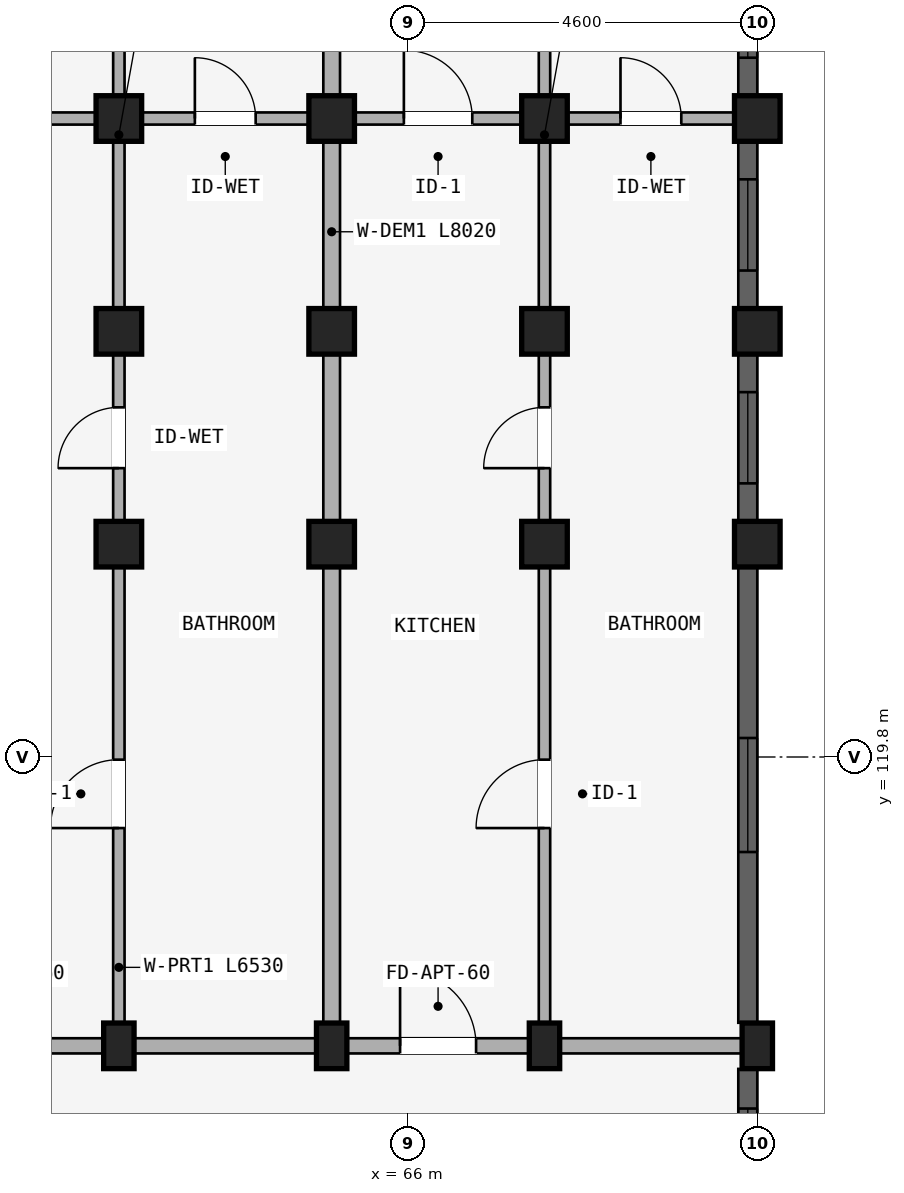
"""IFC4 building model, lengths in metres.
Left out: names, types, materials, properties, quantities, classifications, styles, units other than length and angle.
Written with IfcOpenShell. Run it as: python <this file> out.ifc"""

import sys

from ifc_helpers import new_model, si_unit, direction, frame, frame_2d, origin, origin_2d, place, context, subcontext, project, spatial, rectangle, extrude, element, fill, save


model = new_model("IFC4")
c1 = context("Model", 3, precision=1e-05, world=origin(), true_north=direction((0.0, 1.0)))
c2 = subcontext(c1, "Body", "Model", "MODEL_VIEW")
j1 = project(units=[si_unit("LENGTHUNIT", "METRE"), si_unit("PLANEANGLEUNIT", "RADIAN")], contexts=[c1])
p1 = place(None, origin())
s1 = spatial("IfcSite", under=j1, at=p1, CompositionType="ELEMENT")
p2 = place(p1, origin())
s2 = spatial("IfcBuilding", under=s1, at=p2, CompositionType="ELEMENT")
p3 = place(p2, frame((0.0, 0.0, 40.2)))
s3 = spatial("IfcBuildingStorey", under=s2, at=p3, CompositionType="ELEMENT", Elevation=40.2)
p4 = place(p3, frame((62.2, 116.0, 0.0), z_axis=(0.0, 0.0, 1.0), x_axis=(1.0, 0.0, 0.0)))
e1 = element("IfcColumn", 1, at=p4, inside=s3, PredefinedType="COLUMN", context=c2, shape_type="SweptSolid", body=[
    extrude(rectangle(XDim=0.4, YDim=0.6, at=origin_2d()), origin(), (0.0, 0.0, 1.0), 2.93),
])
for number, where, z_axis, x_axis in (
    (2, (62.2, 122.6, 0.0), (0.0, 0.0, 1.0), (1.0, 0.0, 0.0)),
    (3, (62.2, 125.4, 0.0), (0.0, 0.0, 1.0), (1.0, 0.0, 0.0)),
    (4, (62.2, 128.2, 0.0), (0.0, 0.0, 1.0), (1.0, 0.0, 0.0)),
):
    element("IfcColumn", number, at=place(p3, frame(where, z_axis=z_axis, x_axis=x_axis)), inside=s3, PredefinedType="COLUMN", context=c2, shape_type="SweptSolid", body=[
        extrude(rectangle(XDim=0.6, YDim=0.6, at=origin_2d()), origin(), (0.0, 0.0, 1.0), 2.93),
    ])
p5 = place(p3, frame((65.0, 116.0, 0.0), z_axis=(0.0, 0.0, 1.0), x_axis=(1.0, 0.0, 0.0)))
e5 = element("IfcColumn", 5, at=p5, inside=s3, PredefinedType="COLUMN", context=c2, shape_type="SweptSolid", body=[
    extrude(rectangle(XDim=0.4, YDim=0.6, at=origin_2d()), origin(), (0.0, 0.0, 1.0), 2.93),
])
for number, where, z_axis, x_axis in (
    (6, (65.0, 122.6, 0.0), (0.0, 0.0, 1.0), (1.0, 0.0, 0.0)),
    (7, (65.0, 125.4, 0.0), (0.0, 0.0, 1.0), (1.0, 0.0, 0.0)),
    (8, (65.0, 128.2, 0.0), (0.0, 0.0, 1.0), (1.0, 0.0, 0.0)),
):
    element("IfcColumn", number, at=place(p3, frame(where, z_axis=z_axis, x_axis=x_axis)), inside=s3, PredefinedType="COLUMN", context=c2, shape_type="SweptSolid", body=[
        extrude(rectangle(XDim=0.6, YDim=0.6, at=origin_2d()), origin(), (0.0, 0.0, 1.0), 2.93),
    ])
p6 = place(p3, frame((67.8, 116.0, 0.0), z_axis=(0.0, 0.0, 1.0), x_axis=(1.0, 0.0, 0.0)))
e9 = element("IfcColumn", 9, at=p6, inside=s3, PredefinedType="COLUMN", context=c2, shape_type="SweptSolid", body=[
    extrude(rectangle(XDim=0.4, YDim=0.6, at=origin_2d()), origin(), (0.0, 0.0, 1.0), 2.93),
])
for number, where, z_axis, x_axis in (
    (10, (67.8, 122.6, 0.0), (0.0, 0.0, 1.0), (1.0, 0.0, 0.0)),
    (11, (67.8, 125.4, 0.0), (0.0, 0.0, 1.0), (1.0, 0.0, 0.0)),
    (12, (67.8, 128.2, 0.0), (0.0, 0.0, 1.0), (1.0, 0.0, 0.0)),
):
    element("IfcColumn", number, at=place(p3, frame(where, z_axis=z_axis, x_axis=x_axis)), inside=s3, PredefinedType="COLUMN", context=c2, shape_type="SweptSolid", body=[
        extrude(rectangle(XDim=0.6, YDim=0.6, at=origin_2d()), origin(), (0.0, 0.0, 1.0), 2.93),
    ])
p7 = place(p3, frame((70.6, 116.0, 0.0), z_axis=(0.0, 0.0, 1.0), x_axis=(1.0, 0.0, 0.0)))
e13 = element("IfcColumn", 13, at=p7, inside=s3, PredefinedType="COLUMN", context=c2, shape_type="SweptSolid", body=[
    extrude(rectangle(XDim=0.4, YDim=0.6, at=origin_2d()), origin(), (0.0, 0.0, 1.0), 2.93),
])
for number, where, z_axis, x_axis in (
    (14, (70.6, 122.6, 0.0), (0.0, 0.0, 1.0), (1.0, 0.0, 0.0)),
    (15, (70.6, 125.4, 0.0), (0.0, 0.0, 1.0), (1.0, 0.0, 0.0)),
    (16, (70.6, 128.2, 0.0), (0.0, 0.0, 1.0), (1.0, 0.0, 0.0)),
):
    element("IfcColumn", number, at=place(p3, frame(where, z_axis=z_axis, x_axis=x_axis)), inside=s3, PredefinedType="COLUMN", context=c2, shape_type="SweptSolid", body=[
        extrude(rectangle(XDim=0.6, YDim=0.6, at=origin_2d()), origin(), (0.0, 0.0, 1.0), 2.93),
    ])
p8 = place(p3, frame((59.4, 116.0, 0.0), z_axis=(0.0, 0.0, 1.0), x_axis=(1.0, 0.0, 0.0)))
e17 = element("IfcWall", 17, at=p8, inside=s3, PredefinedType="STANDARD", context=c2, shape_type="SweptSolid", body=[
    extrude(rectangle(XDim=2.8, YDim=0.2, at=frame_2d((1.4, 0.0))), origin(), (0.0, 0.0, 1.0), 2.372),
])
p9 = place(p8, frame((0.9, 0.0, 0.0)))
e18 = element("IfcOpeningElement", 18, at=p9, cuts=e17, PredefinedType="OPENING", context=c2, shape_type="SweptSolid", body=[
    extrude(rectangle(XDim=1.0, YDim=2.15, at=frame_2d((0.5, 1.075))), frame((0.0, 0.11, 0.0), z_axis=(0.0, -1.0, 0.0), x_axis=(1.0, 0.0, 0.0)), (0.0, 0.0, 1.0), 0.22),
])
p10 = place(p3, frame((59.48, 128.2, 0.0), z_axis=(0.0, 0.0, 1.0), x_axis=(1.0, 0.0, 0.0)))
e19 = element("IfcWall", 19, at=p10, inside=s3, PredefinedType="PLUMBINGWALL", context=c2, shape_type="SweptSolid", body=[
    extrude(rectangle(XDim=2.64, YDim=0.16, at=frame_2d((1.32, 0.0))), origin(), (0.0, 0.0, 1.0), 2.372),
])
p11 = place(p10, frame((0.87, 0.0, 0.0)))
e20 = element("IfcOpeningElement", 20, at=p11, cuts=e19, PredefinedType="OPENING", context=c2, shape_type="SweptSolid", body=[
    extrude(rectangle(XDim=0.9, YDim=2.1, at=frame_2d((0.45, 1.05))), frame((0.0, 0.09, 0.0), z_axis=(0.0, -1.0, 0.0), x_axis=(1.0, 0.0, 0.0)), (0.0, 0.0, 1.0), 0.18),
])
p12 = place(p3, frame((62.2, 116.0, 0.0), z_axis=(0.0, 0.0, 1.0), x_axis=(1.0, 0.0, 0.0)))
e21 = element("IfcWall", 21, at=p12, inside=s3, PredefinedType="STANDARD", context=c2, shape_type="SweptSolid", body=[
    extrude(rectangle(XDim=2.8, YDim=0.2, at=frame_2d((1.4, 0.0))), origin(), (0.0, 0.0, 1.0), 2.372),
])
p13 = place(p3, frame((62.28, 128.2, 0.0), z_axis=(0.0, 0.0, 1.0), x_axis=(1.0, 0.0, 0.0)))
e22 = element("IfcWall", 22, at=p13, inside=s3, PredefinedType="PLUMBINGWALL", context=c2, shape_type="SweptSolid", body=[
    extrude(rectangle(XDim=2.64, YDim=0.16, at=frame_2d((1.32, 0.0))), origin(), (0.0, 0.0, 1.0), 2.372),
])
p14 = place(p13, frame((0.92, 0.0, 0.0)))
e23 = element("IfcOpeningElement", 23, at=p14, cuts=e22, PredefinedType="OPENING", context=c2, shape_type="SweptSolid", body=[
    extrude(rectangle(XDim=0.8, YDim=2.1, at=frame_2d((0.4, 1.05))), frame((0.0, 0.09, 0.0), z_axis=(0.0, -1.0, 0.0), x_axis=(1.0, 0.0, 0.0)), (0.0, 0.0, 1.0), 0.18),
])
p15 = place(p3, frame((65.0, 116.0, 0.0), z_axis=(0.0, 0.0, 1.0), x_axis=(1.0, 0.0, 0.0)))
e24 = element("IfcWall", 24, at=p15, inside=s3, PredefinedType="STANDARD", context=c2, shape_type="SweptSolid", body=[
    extrude(rectangle(XDim=2.8, YDim=0.2, at=frame_2d((1.4, 0.0))), origin(), (0.0, 0.0, 1.0), 2.372),
])
p16 = place(p15, frame((0.9, 0.0, 0.0)))
e25 = element("IfcOpeningElement", 25, at=p16, cuts=e24, PredefinedType="OPENING", context=c2, shape_type="SweptSolid", body=[
    extrude(rectangle(XDim=1.0, YDim=2.15, at=frame_2d((0.5, 1.075))), frame((0.0, 0.11, 0.0), z_axis=(0.0, -1.0, 0.0), x_axis=(1.0, 0.0, 0.0)), (0.0, 0.0, 1.0), 0.22),
])
p17 = place(p3, frame((65.08, 128.2, 0.0), z_axis=(0.0, 0.0, 1.0), x_axis=(1.0, 0.0, 0.0)))
e26 = element("IfcWall", 26, at=p17, inside=s3, PredefinedType="PLUMBINGWALL", context=c2, shape_type="SweptSolid", body=[
    extrude(rectangle(XDim=2.64, YDim=0.16, at=frame_2d((1.32, 0.0))), origin(), (0.0, 0.0, 1.0), 2.372),
])
p18 = place(p17, frame((0.87, 0.0, 0.0)))
e27 = element("IfcOpeningElement", 27, at=p18, cuts=e26, PredefinedType="OPENING", context=c2, shape_type="SweptSolid", body=[
    extrude(rectangle(XDim=0.9, YDim=2.1, at=frame_2d((0.45, 1.05))), frame((0.0, 0.09, 0.0), z_axis=(0.0, -1.0, 0.0), x_axis=(1.0, 0.0, 0.0)), (0.0, 0.0, 1.0), 0.18),
])
p19 = place(p3, frame((67.8, 116.0, 0.0), z_axis=(0.0, 0.0, 1.0), x_axis=(1.0, 0.0, 0.0)))
e28 = element("IfcWall", 28, at=p19, inside=s3, PredefinedType="STANDARD", context=c2, shape_type="SweptSolid", body=[
    extrude(rectangle(XDim=2.8, YDim=0.2, at=frame_2d((1.4, 0.0))), origin(), (0.0, 0.0, 1.0), 2.372),
])
p20 = place(p3, frame((67.88, 128.2, 0.0), z_axis=(0.0, 0.0, 1.0), x_axis=(1.0, 0.0, 0.0)))
e29 = element("IfcWall", 29, at=p20, inside=s3, PredefinedType="PLUMBINGWALL", context=c2, shape_type="SweptSolid", body=[
    extrude(rectangle(XDim=2.64, YDim=0.16, at=frame_2d((1.32, 0.0))), origin(), (0.0, 0.0, 1.0), 2.372),
])
p21 = place(p20, frame((0.92, 0.0, 0.0)))
e30 = element("IfcOpeningElement", 30, at=p21, cuts=e29, PredefinedType="OPENING", context=c2, shape_type="SweptSolid", body=[
    extrude(rectangle(XDim=0.8, YDim=2.1, at=frame_2d((0.4, 1.05))), frame((0.0, 0.09, 0.0), z_axis=(0.0, -1.0, 0.0), x_axis=(1.0, 0.0, 0.0)), (0.0, 0.0, 1.0), 0.18),
])
p22 = place(p3, frame((62.2, 116.05, 0.0), z_axis=(0.0, 0.0, 1.0), x_axis=(0.0, 1.0, 0.0)))
e31 = element("IfcWall", 31, at=p22, inside=s3, PredefinedType="PARTITIONING", context=c2, shape_type="SweptSolid", body=[
    extrude(rectangle(XDim=6.53, YDim=0.15, at=frame_2d((3.265, 0.0))), origin(), (0.0, 0.0, 1.0), 2.372),
])
p23 = place(p22, frame((2.815, 0.0, 0.0)))
e32 = element("IfcOpeningElement", 32, at=p23, cuts=e31, PredefinedType="OPENING", context=c2, shape_type="SweptSolid", body=[
    extrude(rectangle(XDim=0.9, YDim=2.1, at=frame_2d((0.45, 1.05))), frame((0.0, 0.085, 0.0), z_axis=(0.0, -1.0, 0.0), x_axis=(1.0, 0.0, 0.0)), (0.0, 0.0, 1.0), 0.17),
])
p24 = place(p3, frame((62.2, 122.7, 0.0), z_axis=(0.0, 0.0, 1.0), x_axis=(0.0, 1.0, 0.0)))
e33 = element("IfcWall", 33, at=p24, inside=s3, PredefinedType="PARTITIONING", context=c2, shape_type="SweptSolid", body=[
    extrude(rectangle(XDim=8.02, YDim=0.15, at=frame_2d((4.01, 0.0))), origin(), (0.0, 0.0, 1.0), 2.372),
])
p25 = place(p24, frame((0.9, 0.0, 0.0)))
e34 = element("IfcOpeningElement", 34, at=p25, cuts=e33, PredefinedType="OPENING", context=c2, shape_type="SweptSolid", body=[
    extrude(rectangle(XDim=0.8, YDim=2.1, at=frame_2d((0.4, 1.05))), frame((0.0, 0.085, 0.0), z_axis=(0.0, -1.0, 0.0), x_axis=(1.0, 0.0, 0.0)), (0.0, 0.0, 1.0), 0.17),
])
p26 = place(p3, frame((65.0, 116.05, 0.0), z_axis=(0.0, 0.0, 1.0), x_axis=(0.0, 1.0, 0.0)))
e35 = element("IfcWall", 35, at=p26, inside=s3, PredefinedType="STANDARD", context=c2, shape_type="SweptSolid", body=[
    extrude(rectangle(XDim=6.53, YDim=0.22, at=frame_2d((3.265, 0.0))), origin(), (0.0, 0.0, 1.0), 2.372),
])
p27 = place(p3, frame((65.0, 122.7, 0.0), z_axis=(0.0, 0.0, 1.0), x_axis=(0.0, 1.0, 0.0)))
e36 = element("IfcWall", 36, at=p27, inside=s3, PredefinedType="STANDARD", context=c2, shape_type="SweptSolid", body=[
    extrude(rectangle(XDim=8.02, YDim=0.22, at=frame_2d((4.01, 0.0))), origin(), (0.0, 0.0, 1.0), 2.372),
])
p28 = place(p3, frame((67.8, 116.05, 0.0), z_axis=(0.0, 0.0, 1.0), x_axis=(0.0, 1.0, 0.0)))
e37 = element("IfcWall", 37, at=p28, inside=s3, PredefinedType="PARTITIONING", context=c2, shape_type="SweptSolid", body=[
    extrude(rectangle(XDim=6.53, YDim=0.15, at=frame_2d((3.265, 0.0))), origin(), (0.0, 0.0, 1.0), 2.372),
])
p29 = place(p28, frame((2.815, 0.0, 0.0)))
e38 = element("IfcOpeningElement", 38, at=p29, cuts=e37, PredefinedType="OPENING", context=c2, shape_type="SweptSolid", body=[
    extrude(rectangle(XDim=0.9, YDim=2.1, at=frame_2d((0.45, 1.05))), frame((0.0, 0.085, 0.0), z_axis=(0.0, -1.0, 0.0), x_axis=(1.0, 0.0, 0.0)), (0.0, 0.0, 1.0), 0.17),
])
p30 = place(p3, frame((67.8, 122.7, 0.0), z_axis=(0.0, 0.0, 1.0), x_axis=(0.0, 1.0, 0.0)))
e39 = element("IfcWall", 39, at=p30, inside=s3, PredefinedType="PARTITIONING", context=c2, shape_type="SweptSolid", body=[
    extrude(rectangle(XDim=8.02, YDim=0.15, at=frame_2d((4.01, 0.0))), origin(), (0.0, 0.0, 1.0), 2.372),
])
p31 = place(p30, frame((0.9, 0.0, 0.0)))
e40 = element("IfcOpeningElement", 40, at=p31, cuts=e39, PredefinedType="OPENING", context=c2, shape_type="SweptSolid", body=[
    extrude(rectangle(XDim=0.8, YDim=2.1, at=frame_2d((0.4, 1.05))), frame((0.0, 0.085, 0.0), z_axis=(0.0, -1.0, 0.0), x_axis=(1.0, 0.0, 0.0)), (0.0, 0.0, 1.0), 0.17),
])
p32 = place(p3, frame((70.475, 113.904, 0.0), z_axis=(0.0, 0.0, 1.0), x_axis=(0.0, 1.0, 0.0)))
e41 = element("IfcWall", 41, at=p32, inside=s3, PredefinedType="STANDARD", context=c2, shape_type="SweptSolid", body=[
    extrude(rectangle(XDim=1.793, YDim=0.25, at=frame_2d((0.896, 0.0))), origin(), (0.0, 0.0, 1.0), 2.372),
])
p33 = place(p32, frame((0.521, 0.0, 0.88)))
e42 = element("IfcOpeningElement", 42, at=p33, cuts=e41, PredefinedType="OPENING", context=c2, shape_type="SweptSolid", body=[
    extrude(rectangle(XDim=0.75, YDim=1.05, at=frame_2d((0.375, 0.525))), frame((0.0, 0.135, 0.0), z_axis=(0.0, -1.0, 0.0), x_axis=(1.0, 0.0, 0.0)), (0.0, 0.0, 1.0), 0.27),
])
p34 = place(p3, frame((70.475, 116.303, 0.0), z_axis=(0.0, 0.0, 1.0), x_axis=(0.0, 1.0, 0.0)))
e43 = element("IfcWall", 43, at=p34, inside=s3, PredefinedType="STANDARD", context=c2, shape_type="SweptSolid", body=[
    extrude(rectangle(XDim=5.993, YDim=0.25, at=frame_2d((2.997, 0.0))), origin(), (0.0, 0.0, 1.0), 2.372),
])
p35 = place(p34, frame((2.247, 0.0, 0.522)))
e44 = element("IfcOpeningElement", 44, at=p35, cuts=e43, PredefinedType="OPENING", context=c2, shape_type="SweptSolid", body=[
    extrude(rectangle(XDim=1.5, YDim=1.65, at=frame_2d((0.75, 0.825))), frame((0.0, 0.135, 0.0), z_axis=(0.0, -1.0, 0.0), x_axis=(1.0, 0.0, 0.0)), (0.0, 0.0, 1.0), 0.27),
])
p36 = place(p3, frame((70.475, 122.904, 0.0), z_axis=(0.0, 0.0, 1.0), x_axis=(0.0, 1.0, 0.0)))
e45 = element("IfcWall", 45, at=p36, inside=s3, PredefinedType="STANDARD", context=c2, shape_type="SweptSolid", body=[
    extrude(rectangle(XDim=2.193, YDim=0.25, at=frame_2d((1.096, 0.0))), origin(), (0.0, 0.0, 1.0), 2.372),
])
p37 = place(p36, frame((0.497, 0.0, 0.672)))
e46 = element("IfcOpeningElement", 46, at=p37, cuts=e45, PredefinedType="OPENING", context=c2, shape_type="SweptSolid", body=[
    extrude(rectangle(XDim=1.2, YDim=1.5, at=frame_2d((0.6, 0.75))), frame((0.0, 0.135, 0.0), z_axis=(0.0, -1.0, 0.0), x_axis=(1.0, 0.0, 0.0)), (0.0, 0.0, 1.0), 0.27),
])
p38 = place(p3, frame((70.475, 125.704, 0.0), z_axis=(0.0, 0.0, 1.0), x_axis=(0.0, 1.0, 0.0)))
e47 = element("IfcWall", 47, at=p38, inside=s3, PredefinedType="STANDARD", context=c2, shape_type="SweptSolid", body=[
    extrude(rectangle(XDim=2.193, YDim=0.25, at=frame_2d((1.096, 0.0))), origin(), (0.0, 0.0, 1.0), 2.372),
])
p39 = place(p38, frame((0.497, 0.0, 0.672)))
e48 = element("IfcOpeningElement", 48, at=p39, cuts=e47, PredefinedType="OPENING", context=c2, shape_type="SweptSolid", body=[
    extrude(rectangle(XDim=1.2, YDim=1.5, at=frame_2d((0.6, 0.75))), frame((0.0, 0.135, 0.0), z_axis=(0.0, -1.0, 0.0), x_axis=(1.0, 0.0, 0.0)), (0.0, 0.0, 1.0), 0.27),
])
p40 = place(p3, frame((70.475, 128.503, 0.0), z_axis=(0.0, 0.0, 1.0), x_axis=(0.0, 1.0, 0.0)))
e49 = element("IfcWall", 49, at=p40, inside=s3, PredefinedType="STANDARD", context=c2, shape_type="SweptSolid", body=[
    extrude(rectangle(XDim=2.193, YDim=0.25, at=frame_2d((1.097, 0.0))), origin(), (0.0, 0.0, 1.0), 2.412),
])
p41 = place(p40, frame((0.497, 0.0, 0.712)))
e50 = element("IfcOpeningElement", 50, at=p41, cuts=e49, PredefinedType="OPENING", context=c2, shape_type="SweptSolid", body=[
    extrude(rectangle(XDim=1.2, YDim=1.5, at=frame_2d((0.6, 0.75))), frame((0.0, 0.135, 0.0), z_axis=(0.0, -1.0, 0.0), x_axis=(1.0, 0.0, 0.0)), (0.0, 0.0, 1.0), 0.27),
])
p42 = place(p33, origin())
e51 = element("IfcWindow", 51, at=p42, inside=s3, PartitioningType="SINGLE_PANEL", PredefinedType="WINDOW", context=c2, shape_type="SweptSolid", body=[
    extrude(rectangle(XDim=0.75, YDim=1.05, at=frame_2d((0.375, 0.525))), frame((0.0, 0.03, 0.0), z_axis=(0.0, -1.0, 0.0), x_axis=(1.0, 0.0, 0.0)), (0.0, 0.0, 1.0), 0.06),
])
fill(e42, e51)
p43 = place(p35, origin())
e52 = element("IfcWindow", 52, at=p43, inside=s3, PartitioningType="DOUBLE_PANEL_VERTICAL", PredefinedType="WINDOW", context=c2, shape_type="SweptSolid", body=[
    extrude(rectangle(XDim=1.5, YDim=1.65, at=frame_2d((0.75, 0.825))), frame((0.0, 0.03, 0.0), z_axis=(0.0, -1.0, 0.0), x_axis=(1.0, 0.0, 0.0)), (0.0, 0.0, 1.0), 0.06),
])
fill(e44, e52)
p44 = place(p37, origin())
e53 = element("IfcWindow", 53, at=p44, inside=s3, PartitioningType="SINGLE_PANEL", PredefinedType="WINDOW", context=c2, shape_type="SweptSolid", body=[
    extrude(rectangle(XDim=1.2, YDim=1.5, at=frame_2d((0.6, 0.75))), frame((0.0, 0.03, 0.0), z_axis=(0.0, -1.0, 0.0), x_axis=(1.0, 0.0, 0.0)), (0.0, 0.0, 1.0), 0.06),
])
fill(e46, e53)
p45 = place(p39, origin())
e54 = element("IfcWindow", 54, at=p45, inside=s3, PartitioningType="SINGLE_PANEL", PredefinedType="WINDOW", context=c2, shape_type="SweptSolid", body=[
    extrude(rectangle(XDim=1.2, YDim=1.5, at=frame_2d((0.6, 0.75))), frame((0.0, 0.03, 0.0), z_axis=(0.0, -1.0, 0.0), x_axis=(1.0, 0.0, 0.0)), (0.0, 0.0, 1.0), 0.06),
])
fill(e48, e54)
p46 = place(p41, origin())
e55 = element("IfcWindow", 55, at=p46, inside=s3, PartitioningType="SINGLE_PANEL", PredefinedType="WINDOW", context=c2, shape_type="SweptSolid", body=[
    extrude(rectangle(XDim=1.2, YDim=1.5, at=frame_2d((0.6, 0.75))), frame((0.0, 0.03, 0.0), z_axis=(0.0, -1.0, 0.0), x_axis=(1.0, 0.0, 0.0)), (0.0, 0.0, 1.0), 0.06),
])
fill(e50, e55)
p47 = place(p14, origin())
e56 = element("IfcDoor", 56, at=p47, inside=s3, OperationType="SINGLE_SWING_LEFT", PredefinedType="DOOR", context=c2, shape_type="SweptSolid", body=[
    extrude(rectangle(XDim=0.8, YDim=2.1, at=frame_2d((0.4, 1.05))), frame((0.0, 0.025, 0.0), z_axis=(0.0, -1.0, 0.0), x_axis=(1.0, 0.0, 0.0)), (0.0, 0.0, 1.0), 0.05),
])
fill(e23, e56)
p48 = place(p18, origin())
e57 = element("IfcDoor", 57, at=p48, inside=s3, OperationType="SINGLE_SWING_LEFT", PredefinedType="DOOR", context=c2, shape_type="SweptSolid", body=[
    extrude(rectangle(XDim=0.9, YDim=2.1, at=frame_2d((0.45, 1.05))), frame((0.0, 0.025, 0.0), z_axis=(0.0, -1.0, 0.0), x_axis=(1.0, 0.0, 0.0)), (0.0, 0.0, 1.0), 0.05),
])
fill(e27, e57)
p49 = place(p16, frame((1.0, 0.0, 0.0), z_axis=(0.0, 0.0, 1.0), x_axis=(-1.0, 0.0, 0.0)))
e58 = element("IfcDoor", 58, at=p49, inside=s3, OperationType="SINGLE_SWING_RIGHT", PredefinedType="DOOR", context=c2, shape_type="SweptSolid", body=[
    extrude(rectangle(XDim=1.0, YDim=2.15, at=frame_2d((0.5, 1.075))), frame((0.0, 0.025, 0.0), z_axis=(0.0, -1.0, 0.0), x_axis=(1.0, 0.0, 0.0)), (0.0, 0.0, 1.0), 0.05),
])
fill(e25, e58)
p50 = place(p21, origin())
e59 = element("IfcDoor", 59, at=p50, inside=s3, OperationType="SINGLE_SWING_LEFT", PredefinedType="DOOR", context=c2, shape_type="SweptSolid", body=[
    extrude(rectangle(XDim=0.8, YDim=2.1, at=frame_2d((0.4, 1.05))), frame((0.0, 0.025, 0.0), z_axis=(0.0, -1.0, 0.0), x_axis=(1.0, 0.0, 0.0)), (0.0, 0.0, 1.0), 0.05),
])
fill(e30, e59)
p51 = place(p23, frame((0.9, 0.0, 0.0), z_axis=(0.0, 0.0, 1.0), x_axis=(-1.0, 0.0, 0.0)))
e60 = element("IfcDoor", 60, at=p51, inside=s3, OperationType="SINGLE_SWING_RIGHT", PredefinedType="DOOR", context=c2, shape_type="SweptSolid", body=[
    extrude(rectangle(XDim=0.9, YDim=2.1, at=frame_2d((0.45, 1.05))), frame((0.0, 0.025, 0.0), z_axis=(0.0, -1.0, 0.0), x_axis=(1.0, 0.0, 0.0)), (0.0, 0.0, 1.0), 0.05),
])
fill(e32, e60)
p52 = place(p25, origin())
e61 = element("IfcDoor", 61, at=p52, inside=s3, OperationType="SINGLE_SWING_LEFT", PredefinedType="DOOR", context=c2, shape_type="SweptSolid", body=[
    extrude(rectangle(XDim=0.8, YDim=2.1, at=frame_2d((0.4, 1.05))), frame((0.0, 0.025, 0.0), z_axis=(0.0, -1.0, 0.0), x_axis=(1.0, 0.0, 0.0)), (0.0, 0.0, 1.0), 0.05),
])
fill(e34, e61)
p53 = place(p29, origin())
e62 = element("IfcDoor", 62, at=p53, inside=s3, OperationType="SINGLE_SWING_LEFT", PredefinedType="DOOR", context=c2, shape_type="SweptSolid", body=[
    extrude(rectangle(XDim=0.9, YDim=2.1, at=frame_2d((0.45, 1.05))), frame((0.0, 0.025, 0.0), z_axis=(0.0, -1.0, 0.0), x_axis=(1.0, 0.0, 0.0)), (0.0, 0.0, 1.0), 0.05),
])
fill(e38, e62)
p54 = place(p31, frame((0.8, 0.0, 0.0), z_axis=(0.0, 0.0, 1.0), x_axis=(-1.0, 0.0, 0.0)))
e63 = element("IfcDoor", 63, at=p54, inside=s3, OperationType="SINGLE_SWING_RIGHT", PredefinedType="DOOR", context=c2, shape_type="SweptSolid", body=[
    extrude(rectangle(XDim=0.8, YDim=2.1, at=frame_2d((0.4, 1.05))), frame((0.0, 0.025, 0.0), z_axis=(0.0, -1.0, 0.0), x_axis=(1.0, 0.0, 0.0)), (0.0, 0.0, 1.0), 0.05),
])
fill(e40, e63)
save(model, sys.argv[1])
